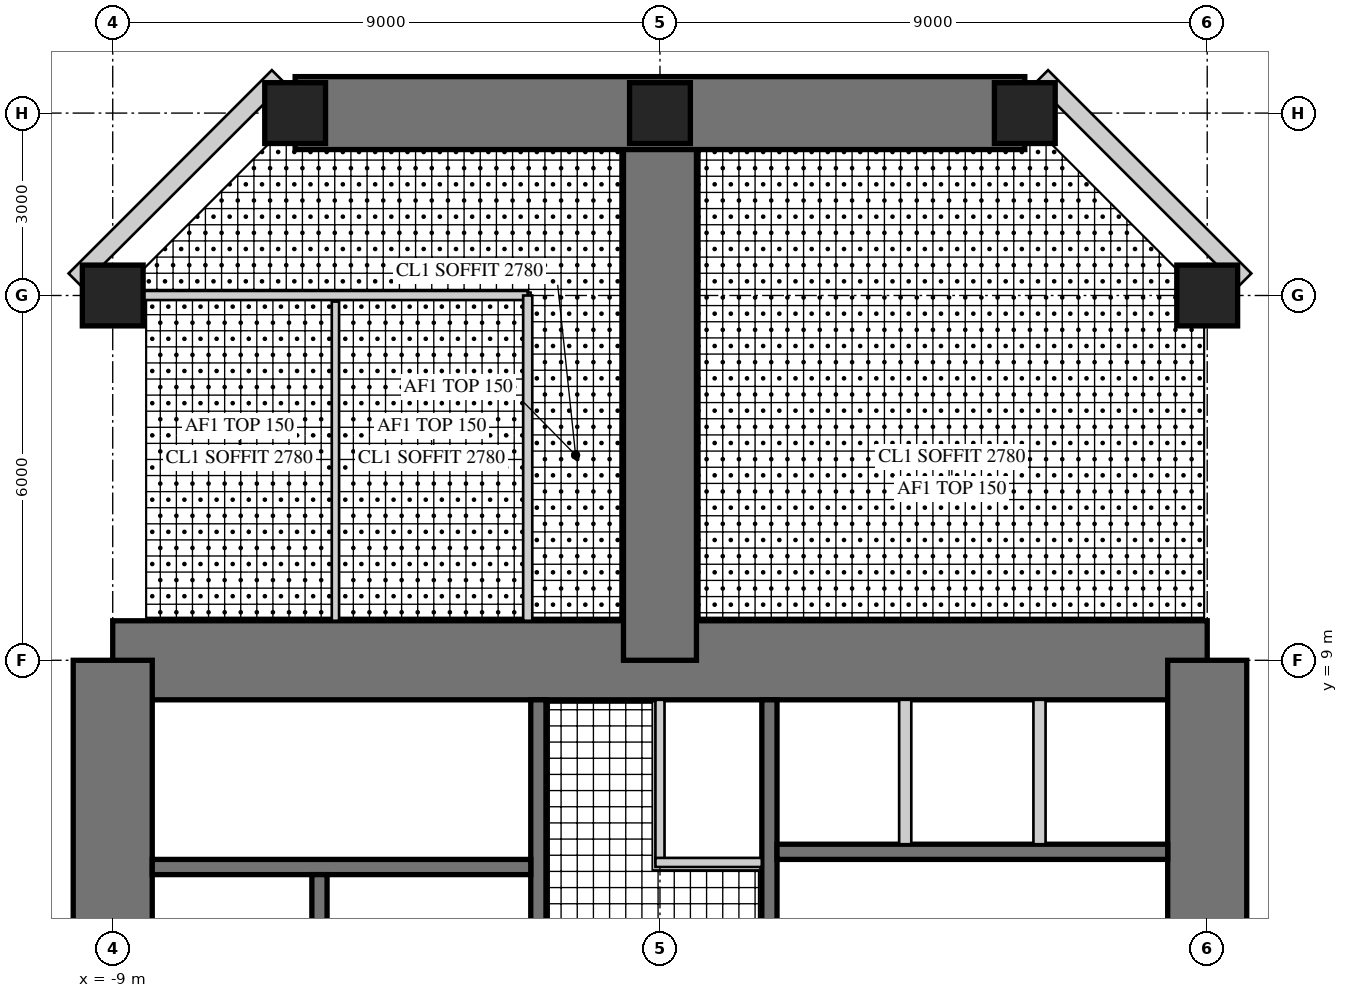
"""IFC4 building model, lengths in metres.
Left out: names, types, materials, properties, quantities, classifications, styles, units other than length and angle.
Written with IfcOpenShell. Run it as: python <this file> out.ifc"""

import sys

from ifc_helpers import new_model, si_unit, direction, frame, frame_2d, origin, origin_2d, place, context, subcontext, project, spatial, rectangle, hollow_rectangle, extrude, element, fill, save


model = new_model("IFC4")
c1 = context("Model", 3, precision=1e-05, world=origin(), true_north=direction((0.0, 1.0)))
c2 = subcontext(c1, "Body", "Model", "MODEL_VIEW")
j1 = project(units=[si_unit("LENGTHUNIT", "METRE"), si_unit("PLANEANGLEUNIT", "RADIAN")], contexts=[c1])
p1 = place(None, origin())
s1 = spatial("IfcSite", under=j1, at=p1, CompositionType="ELEMENT")
p2 = place(p1, origin())
s2 = spatial("IfcBuilding", under=s1, at=p2, CompositionType="ELEMENT")
p3 = place(p2, frame((0.0, 0.0, 136.5)))
s3 = spatial("IfcBuildingStorey", under=s2, at=p3, CompositionType="ELEMENT", Elevation=136.5)
p4 = place(p3, frame((9.0, 9.0, 0.0), z_axis=(0.0, 0.0, 1.0), x_axis=(-1.0, 0.0, 0.0)))
e1 = element("IfcWall", 1, at=p4, inside=s3, PredefinedType="SHEAR", context=c2, shape_type="SweptSolid", body=[
    extrude(rectangle(XDim=18.0, YDim=1.3, at=frame_2d((9.0, 0.0))), origin(), (0.0, 0.0, 1.0), 4.0),
])
p5 = place(p4, frame((9.8, 0.0, 0.0)))
e2 = element("IfcOpeningElement", 2, at=p5, cuts=e1, PredefinedType="OPENING", context=c2, shape_type="SweptSolid", body=[
    extrude(rectangle(XDim=1.0, YDim=2.4, at=frame_2d((0.5, 1.2))), frame((0.0, 0.66, 0.0), z_axis=(0.0, -1.0, 0.0), x_axis=(1.0, 0.0, 0.0)), (0.0, 0.0, 1.0), 1.32),
])
p6 = place(p3, frame((9.0, -9.0, 0.0), z_axis=(0.0, 0.0, 1.0), x_axis=(0.0, 1.0, 0.0)))
e3 = element("IfcWall", 3, at=p6, inside=s3, PredefinedType="SHEAR", context=c2, shape_type="SweptSolid", body=[
    extrude(rectangle(XDim=18.0, YDim=1.3, at=frame_2d((9.0, 0.0))), origin(), (0.0, 0.0, 1.0), 4.0),
])
p7 = place(p6, frame((9.8, 0.0, 0.0)))
e4 = element("IfcOpeningElement", 4, at=p7, cuts=e3, PredefinedType="OPENING", context=c2, shape_type="SweptSolid", body=[
    extrude(rectangle(XDim=1.0, YDim=2.4, at=frame_2d((0.5, 1.2))), frame((0.0, 0.66, 0.0), z_axis=(0.0, -1.0, 0.0), x_axis=(1.0, 0.0, 0.0)), (0.0, 0.0, 1.0), 1.32),
])
p8 = place(p3, frame((-9.0, 9.0, 0.0), z_axis=(0.0, 0.0, 1.0), x_axis=(0.0, -1.0, 0.0)))
e5 = element("IfcWall", 5, at=p8, inside=s3, PredefinedType="SHEAR", context=c2, shape_type="SweptSolid", body=[
    extrude(rectangle(XDim=18.0, YDim=1.3, at=frame_2d((9.0, 0.0))), origin(), (0.0, 0.0, 1.0), 4.0),
])
p9 = place(p8, frame((9.8, 0.0, 0.0)))
e6 = element("IfcOpeningElement", 6, at=p9, cuts=e5, PredefinedType="OPENING", context=c2, shape_type="SweptSolid", body=[
    extrude(rectangle(XDim=1.0, YDim=2.4, at=frame_2d((0.5, 1.2))), frame((0.0, 0.66, 0.0), z_axis=(0.0, -1.0, 0.0), x_axis=(1.0, 0.0, 0.0)), (0.0, 0.0, 1.0), 1.32),
])
p10 = place(p3, frame((1.8, 1.875, 0.0), z_axis=(0.0, 0.0, 1.0), x_axis=(0.0, 1.0, 0.0)))
e7 = element("IfcWall", 7, at=p10, inside=s3, PredefinedType="SHEAR", context=c2, shape_type="SweptSolid", body=[
    extrude(rectangle(XDim=6.475, YDim=0.25, at=frame_2d((3.238, 0.0))), origin(), (0.0, 0.0, 1.0), 4.0),
])
p11 = place(p10, frame((1.875, 0.0, 0.0)))
e8 = element("IfcOpeningElement", 8, at=p11, cuts=e7, PredefinedType="OPENING", context=c2, shape_type="SweptSolid", body=[
    extrude(rectangle(XDim=1.6, YDim=2.4, at=frame_2d((0.8, 1.2))), frame((0.0, 0.135, 0.0), z_axis=(0.0, -1.0, 0.0), x_axis=(1.0, 0.0, 0.0)), (0.0, 0.0, 1.0), 0.27),
])
p12 = place(p3, frame((1.925, 5.85, 0.0), z_axis=(0.0, 0.0, 1.0), x_axis=(1.0, 0.0, 0.0)))
e9 = element("IfcWall", 9, at=p12, inside=s3, PredefinedType="SHEAR", context=c2, shape_type="SweptSolid", body=[
    extrude(rectangle(XDim=6.425, YDim=0.25, at=frame_2d((3.212, 0.0))), origin(), (0.0, 0.0, 1.0), 4.0),
])
p13 = place(p12, frame((0.454, 0.0, 0.0)))
e10 = element("IfcOpeningElement", 10, at=p13, cuts=e9, PredefinedType="OPENING", context=c2, shape_type="SweptSolid", body=[
    extrude(rectangle(XDim=1.1, YDim=2.2, at=frame_2d((0.55, 1.1))), frame((0.0, 0.135, 0.0), z_axis=(0.0, -1.0, 0.0), x_axis=(1.0, 0.0, 0.0)), (0.0, 0.0, 1.0), 0.27),
])
p14 = place(p12, frame((2.663, 0.0, 0.0)))
e11 = element("IfcOpeningElement", 11, at=p14, cuts=e9, PredefinedType="OPENING", context=c2, shape_type="SweptSolid", body=[
    extrude(rectangle(XDim=1.1, YDim=2.2, at=frame_2d((0.55, 1.1))), frame((0.0, 0.135, 0.0), z_axis=(0.0, -1.0, 0.0), x_axis=(1.0, 0.0, 0.0)), (0.0, 0.0, 1.0), 0.27),
])
p15 = place(p12, frame((4.871, 0.0, 0.0)))
e12 = element("IfcOpeningElement", 12, at=p15, cuts=e9, PredefinedType="OPENING", context=c2, shape_type="SweptSolid", body=[
    extrude(rectangle(XDim=1.1, YDim=2.2, at=frame_2d((0.55, 1.1))), frame((0.0, 0.135, 0.0), z_axis=(0.0, -1.0, 0.0), x_axis=(1.0, 0.0, 0.0)), (0.0, 0.0, 1.0), 0.27),
])
for number, where, z_axis, x_axis in (
    (13, (4.033, 5.975, 0.0), (0.0, 0.0, 1.0), (0.0, 1.0, 0.0)),
    (14, (6.242, 5.975, 0.0), (0.0, 0.0, 1.0), (0.0, 1.0, 0.0)),
):
    element("IfcWall", number, at=place(p3, frame(where, z_axis=z_axis, x_axis=x_axis)), inside=s3, PredefinedType="PARTITIONING", context=c2, shape_type="SweptSolid", body=[
        extrude(rectangle(XDim=2.375, YDim=0.2, at=frame_2d((1.188, 0.0))), origin(), (0.0, 0.0, 1.0), 4.0),
    ])
p16 = place(p3, frame((-2.0, 1.675, 0.0), z_axis=(0.0, 0.0, 1.0), x_axis=(0.0, 1.0, 0.0)))
e15 = element("IfcWall", 15, at=p16, inside=s3, PredefinedType="SHEAR", context=c2, shape_type="SweptSolid", body=[
    extrude(rectangle(XDim=6.675, YDim=0.25, at=frame_2d((3.337, 0.0))), origin(), (0.0, 0.0, 1.0), 4.0),
])
p17 = place(p16, frame((0.725, 0.0, 0.0)))
e16 = element("IfcOpeningElement", 16, at=p17, cuts=e15, PredefinedType="OPENING", context=c2, shape_type="SweptSolid", body=[
    extrude(rectangle(XDim=1.0, YDim=2.1, at=frame_2d((0.5, 1.05))), frame((0.0, 0.135, 0.0), z_axis=(0.0, -1.0, 0.0), x_axis=(1.0, 0.0, 0.0)), (0.0, 0.0, 1.0), 0.27),
])
p18 = place(p3, frame((-2.125, 5.6, 0.0), z_axis=(0.0, 0.0, 1.0), x_axis=(-1.0, 0.0, 0.0)))
e17 = element("IfcWall", 17, at=p18, inside=s3, PredefinedType="SHEAR", context=c2, shape_type="SweptSolid", body=[
    extrude(rectangle(XDim=6.225, YDim=0.25, at=frame_2d((3.113, 0.0))), origin(), (0.0, 0.0, 1.0), 4.0),
])
p19 = place(p18, frame((0.175, 0.0, 0.0)))
e18 = element("IfcOpeningElement", 18, at=p19, cuts=e17, PredefinedType="OPENING", context=c2, shape_type="SweptSolid", body=[
    extrude(rectangle(XDim=1.0, YDim=2.1, at=frame_2d((0.5, 1.05))), frame((0.0, 0.135, 0.0), z_axis=(0.0, -1.0, 0.0), x_axis=(1.0, 0.0, 0.0)), (0.0, 0.0, 1.0), 0.27),
])
p20 = place(p3, frame((-5.6, 1.925, 0.0), z_axis=(0.0, 0.0, 1.0), x_axis=(0.0, 1.0, 0.0)))
e19 = element("IfcWall", 19, at=p20, inside=s3, PredefinedType="SHEAR", context=c2, shape_type="SweptSolid", body=[
    extrude(rectangle(XDim=3.55, YDim=0.25, at=frame_2d((1.775, 0.0))), origin(), (0.0, 0.0, 1.0), 4.0),
])
p21 = place(p20, frame((1.525, 0.0, 0.0)))
e20 = element("IfcOpeningElement", 20, at=p21, cuts=e19, PredefinedType="OPENING", context=c2, shape_type="SweptSolid", body=[
    extrude(rectangle(XDim=1.1, YDim=2.2, at=frame_2d((0.55, 1.1))), frame((0.0, 0.135, 0.0), z_axis=(0.0, -1.0, 0.0), x_axis=(1.0, 0.0, 0.0)), (0.0, 0.0, 1.0), 0.27),
])
p22 = place(p20, frame((0.075, 0.0, 0.0)))
e21 = element("IfcOpeningElement", 21, at=p22, cuts=e19, PredefinedType="OPENING", context=c2, shape_type="SweptSolid", body=[
    extrude(rectangle(XDim=0.8, YDim=2.1, at=frame_2d((0.4, 1.05))), frame((0.0, 0.135, 0.0), z_axis=(0.0, -1.0, 0.0), x_axis=(1.0, 0.0, 0.0)), (0.0, 0.0, 1.0), 0.27),
])
p23 = place(p3, frame((0.0, 9.0, 0.0), z_axis=(0.0, 0.0, 1.0), x_axis=(0.0, 1.0, 0.0)))
e22 = element("IfcWall", 22, at=p23, inside=s3, PredefinedType="SHEAR", context=c2, shape_type="SweptSolid", body=[
    extrude(rectangle(XDim=9.0, YDim=1.2, at=frame_2d((4.5, 0.0))), origin(), (0.0, 0.0, 1.0), 4.0),
])
p24 = place(p23, frame((4.3, 0.0, 0.0)))
e23 = element("IfcOpeningElement", 23, at=p24, cuts=e22, PredefinedType="OPENING", context=c2, shape_type="SweptSolid", body=[
    extrude(rectangle(XDim=1.0, YDim=2.2, at=frame_2d((0.5, 1.1))), frame((0.0, 0.61, 0.0), z_axis=(0.0, -1.0, 0.0), x_axis=(1.0, 0.0, 0.0)), (0.0, 0.0, 1.0), 1.22),
])
p25 = place(p3, frame((6.0, 18.0, 0.0), z_axis=(0.0, 0.0, 1.0), x_axis=(-1.0, 0.0, 0.0)))
e24 = element("IfcWall", 24, at=p25, inside=s3, PredefinedType="SHEAR", context=c2, shape_type="SweptSolid", body=[
    extrude(rectangle(XDim=12.0, YDim=1.2, at=frame_2d((6.0, 0.0))), origin(), (0.0, 0.0, 1.0), 4.0),
])
p26 = place(p25, frame((1.55, 0.0, 0.6)))
e25 = element("IfcOpeningElement", 25, at=p26, cuts=e24, PredefinedType="OPENING", context=c2, shape_type="SweptSolid", body=[
    extrude(rectangle(XDim=3.0, YDim=2.4, at=frame_2d((1.5, 1.2))), frame((0.0, 0.61, 0.0), z_axis=(0.0, -1.0, 0.0), x_axis=(1.0, 0.0, 0.0)), (0.0, 0.0, 1.0), 1.22),
])
p27 = place(p25, frame((7.45, 0.0, 0.6)))
e26 = element("IfcOpeningElement", 26, at=p27, cuts=e24, PredefinedType="OPENING", context=c2, shape_type="SweptSolid", body=[
    extrude(rectangle(XDim=3.0, YDim=2.4, at=frame_2d((1.5, 1.2))), frame((0.0, 0.61, 0.0), z_axis=(0.0, -1.0, 0.0), x_axis=(1.0, 0.0, 0.0)), (0.0, 0.0, 1.0), 1.22),
])
for number, where, z_axis, x_axis in (
    (27, (9.0, 15.0, 0.0), (0.0, 0.0, 1.0), (1.0, 0.0, 0.0)),
    (28, (-9.0, 15.0, 0.0), (0.0, 0.0, 1.0), (1.0, 0.0, 0.0)),
    (29, (6.0, 18.0, 0.0), (0.0, 0.0, 1.0), (1.0, 0.0, 0.0)),
    (30, (0.0, 18.0, 0.0), (0.0, 0.0, 1.0), (1.0, 0.0, 0.0)),
    (31, (-6.0, 18.0, 0.0), (0.0, 0.0, 1.0), (1.0, 0.0, 0.0)),
):
    element("IfcColumn", number, at=place(p3, frame(where, z_axis=z_axis, x_axis=x_axis)), inside=s3, PredefinedType="COLUMN", context=c2, shape_type="SweptSolid", body=[
        extrude(rectangle(XDim=1.0, YDim=1.0, at=origin_2d()), origin(), (0.0, 0.0, 1.0), 4.0),
    ])
p28 = place(p3, frame((9.62, 15.257, 0.0), z_axis=(0.0, 0.0, 1.0), x_axis=(-0.707106781187, 0.707106781187, 0.0)))
e32 = element("IfcWall", 32, at=p28, inside=s3, PredefinedType="SOLIDWALL", context=c2, shape_type="SweptSolid", body=[
    extrude(rectangle(XDim=4.728, YDim=0.3, at=frame_2d((2.364, 0.0))), origin(), (0.0, 0.0, 1.0), 3.8),
])
p29 = place(p28, frame((1.914, 0.0, 0.3)))
e33 = element("IfcOpeningElement", 33, at=p29, cuts=e32, PredefinedType="OPENING", context=c2, shape_type="SweptSolid", body=[
    extrude(rectangle(XDim=0.9, YDim=2.4, at=frame_2d((0.45, 1.2))), frame((0.0, 0.16, 0.0), z_axis=(0.0, -1.0, 0.0), x_axis=(1.0, 0.0, 0.0)), (0.0, 0.0, 1.0), 0.32),
])
p30 = place(p3, frame((-6.277, 18.6, 0.0), z_axis=(0.0, 0.0, 1.0), x_axis=(-0.707106781187, -0.707106781187, 0.0)))
e34 = element("IfcWall", 34, at=p30, inside=s3, PredefinedType="SOLIDWALL", context=c2, shape_type="SweptSolid", body=[
    extrude(rectangle(XDim=4.728, YDim=0.3, at=frame_2d((2.364, 0.0))), origin(), (0.0, 0.0, 1.0), 3.8),
])
p31 = place(p30, frame((1.914, 0.0, 0.3)))
e35 = element("IfcOpeningElement", 35, at=p31, cuts=e34, PredefinedType="OPENING", context=c2, shape_type="SweptSolid", body=[
    extrude(rectangle(XDim=0.9, YDim=2.4, at=frame_2d((0.45, 1.2))), frame((0.0, 0.16, 0.0), z_axis=(0.0, -1.0, 0.0), x_axis=(1.0, 0.0, 0.0)), (0.0, 0.0, 1.0), 0.32),
])
p32 = place(p3, frame((0.0, 5.675, 0.0), z_axis=(0.0, 0.0, 1.0), x_axis=(0.0, 1.0, 0.0)))
e36 = element("IfcWall", 36, at=p32, inside=s3, PredefinedType="PARTITIONING", context=c2, shape_type="SweptSolid", body=[
    extrude(rectangle(XDim=2.675, YDim=0.15, at=frame_2d((1.337, 0.0))), origin(), (0.0, 0.0, 1.0), 3.8),
])
p33 = place(p32, frame((0.4, 0.0, 0.0)))
e37 = element("IfcOpeningElement", 37, at=p33, cuts=e36, PredefinedType="OPENING", context=c2, shape_type="SweptSolid", body=[
    extrude(rectangle(XDim=1.0, YDim=2.1, at=frame_2d((0.5, 1.05))), frame((0.0, 0.085, 0.0), z_axis=(0.0, -1.0, 0.0), x_axis=(1.0, 0.0, 0.0)), (0.0, 0.0, 1.0), 0.17),
])
p34 = place(p3, frame((1.675, 5.675, 0.0), z_axis=(0.0, 0.0, 1.0), x_axis=(-1.0, 0.0, 0.0)))
e38 = element("IfcWall", 38, at=p34, inside=s3, PredefinedType="PARTITIONING", context=c2, shape_type="SweptSolid", body=[
    extrude(rectangle(XDim=1.75, YDim=0.15, at=frame_2d((0.875, 0.0))), origin(), (0.0, 0.0, 1.0), 3.8),
])
p35 = place(p3, frame((-2.175, 15.0, 0.0), z_axis=(0.0, 0.0, 1.0), x_axis=(-1.0, 0.0, 0.0)))
e39 = element("IfcWall", 39, at=p35, inside=s3, PredefinedType="PARTITIONING", context=c2, shape_type="SweptSolid", body=[
    extrude(rectangle(XDim=6.325, YDim=0.15, at=frame_2d((3.163, 0.0))), origin(), (0.0, 0.0, 1.0), 3.0),
])
p36 = place(p35, frame((1.081, 0.0, 0.0)))
e40 = element("IfcOpeningElement", 40, at=p36, cuts=e39, PredefinedType="OPENING", context=c2, shape_type="SweptSolid", body=[
    extrude(rectangle(XDim=1.0, YDim=2.1, at=frame_2d((0.5, 1.05))), frame((0.0, 0.085, 0.0), z_axis=(0.0, -1.0, 0.0), x_axis=(1.0, 0.0, 0.0)), (0.0, 0.0, 1.0), 0.17),
])
p37 = place(p35, frame((4.244, 0.0, 0.0)))
e41 = element("IfcOpeningElement", 41, at=p37, cuts=e39, PredefinedType="OPENING", context=c2, shape_type="SweptSolid", body=[
    extrude(rectangle(XDim=1.0, YDim=2.1, at=frame_2d((0.5, 1.05))), frame((0.0, 0.085, 0.0), z_axis=(0.0, -1.0, 0.0), x_axis=(1.0, 0.0, 0.0)), (0.0, 0.0, 1.0), 0.17),
])
p38 = place(p3, frame((-2.175, 9.65, 0.0), z_axis=(0.0, 0.0, 1.0), x_axis=(0.0, 1.0, 0.0)))
e42 = element("IfcWall", 42, at=p38, inside=s3, PredefinedType="PARTITIONING", context=c2, shape_type="SweptSolid", body=[
    extrude(rectangle(XDim=5.35, YDim=0.15, at=frame_2d((2.675, 0.0))), origin(), (0.0, 0.0, 1.0), 3.8),
])
p39 = place(p3, frame((-5.337, 9.65, 0.0), z_axis=(0.0, 0.0, 1.0), x_axis=(0.0, 1.0, 0.0)))
e43 = element("IfcWall", 43, at=p39, inside=s3, PredefinedType="PLUMBINGWALL", context=c2, shape_type="SweptSolid", body=[
    extrude(rectangle(XDim=5.25, YDim=0.12, at=frame_2d((2.625, 0.0))), origin(), (0.0, 0.0, 1.0), 3.8),
])
p40 = place(p29, origin())
e44 = element("IfcWindow", 44, at=p40, inside=s3, PartitioningType="SINGLE_PANEL", PredefinedType="WINDOW", context=c2, shape_type="SweptSolid", body=[
    extrude(hollow_rectangle(XDim=0.9, YDim=2.4, WallThickness=0.06, at=frame_2d((0.45, 1.2))), frame((0.0, 0.03, 0.0), z_axis=(0.0, -1.0, 0.0), x_axis=(1.0, 0.0, 0.0)), (0.0, 0.0, 1.0), 0.06),
    extrude(rectangle(XDim=0.779, YDim=2.279, at=frame_2d((0.45, 1.2))), frame((0.0, 0.03, 0.0), z_axis=(0.0, -1.0, 0.0), x_axis=(1.0, 0.0, 0.0)), (0.0, 0.0, 1.0), 0.06),
])
fill(e33, e44)
p41 = place(p26, origin())
e45 = element("IfcWindow", 45, at=p41, inside=s3, PartitioningType="SINGLE_PANEL", PredefinedType="WINDOW", context=c2, shape_type="SweptSolid", body=[
    extrude(hollow_rectangle(XDim=3.0, YDim=2.4, WallThickness=0.06, at=frame_2d((1.5, 1.2))), frame((0.0, 0.03, 0.0), z_axis=(0.0, -1.0, 0.0), x_axis=(1.0, 0.0, 0.0)), (0.0, 0.0, 1.0), 0.06),
    extrude(rectangle(XDim=2.879, YDim=2.279, at=frame_2d((1.5, 1.2))), frame((0.0, 0.03, 0.0), z_axis=(0.0, -1.0, 0.0), x_axis=(1.0, 0.0, 0.0)), (0.0, 0.0, 1.0), 0.06),
])
fill(e25, e45)
p42 = place(p27, origin())
e46 = element("IfcWindow", 46, at=p42, inside=s3, PartitioningType="SINGLE_PANEL", PredefinedType="WINDOW", context=c2, shape_type="SweptSolid", body=[
    extrude(hollow_rectangle(XDim=3.0, YDim=2.4, WallThickness=0.06, at=frame_2d((1.5, 1.2))), frame((0.0, 0.03, 0.0), z_axis=(0.0, -1.0, 0.0), x_axis=(1.0, 0.0, 0.0)), (0.0, 0.0, 1.0), 0.06),
    extrude(rectangle(XDim=2.879, YDim=2.279, at=frame_2d((1.5, 1.2))), frame((0.0, 0.03, 0.0), z_axis=(0.0, -1.0, 0.0), x_axis=(1.0, 0.0, 0.0)), (0.0, 0.0, 1.0), 0.06),
])
fill(e26, e46)
p43 = place(p31, origin())
e47 = element("IfcWindow", 47, at=p43, inside=s3, PartitioningType="SINGLE_PANEL", PredefinedType="WINDOW", context=c2, shape_type="SweptSolid", body=[
    extrude(hollow_rectangle(XDim=0.9, YDim=2.4, WallThickness=0.06, at=frame_2d((0.45, 1.2))), frame((0.0, 0.03, 0.0), z_axis=(0.0, -1.0, 0.0), x_axis=(1.0, 0.0, 0.0)), (0.0, 0.0, 1.0), 0.06),
    extrude(rectangle(XDim=0.779, YDim=2.279, at=frame_2d((0.45, 1.2))), frame((0.0, 0.03, 0.0), z_axis=(0.0, -1.0, 0.0), x_axis=(1.0, 0.0, 0.0)), (0.0, 0.0, 1.0), 0.06),
])
fill(e35, e47)
p44 = place(p33, frame((1.0, 0.0, 0.0), z_axis=(0.0, 0.0, 1.0), x_axis=(-1.0, 0.0, 0.0)))
e48 = element("IfcDoor", 48, at=p44, inside=s3, OperationType="SINGLE_SWING_RIGHT", PredefinedType="DOOR", context=c2, shape_type="SweptSolid", body=[
    extrude(rectangle(XDim=1.0, YDim=2.1, at=frame_2d((0.5, 1.05))), frame((0.0, 0.025, 0.0), z_axis=(0.0, -1.0, 0.0), x_axis=(1.0, 0.0, 0.0)), (0.0, 0.0, 1.0), 0.05),
])
fill(e37, e48)
p45 = place(p36, origin())
e49 = element("IfcDoor", 49, at=p45, inside=s3, OperationType="SINGLE_SWING_LEFT", PredefinedType="DOOR", context=c2, shape_type="SweptSolid", body=[
    extrude(rectangle(XDim=1.0, YDim=2.1, at=frame_2d((0.5, 1.05))), frame((0.0, 0.025, 0.0), z_axis=(0.0, -1.0, 0.0), x_axis=(1.0, 0.0, 0.0)), (0.0, 0.0, 1.0), 0.05),
])
fill(e40, e49)
p46 = place(p37, origin())
e50 = element("IfcDoor", 50, at=p46, inside=s3, OperationType="SINGLE_SWING_LEFT", PredefinedType="DOOR", context=c2, shape_type="SweptSolid", body=[
    extrude(rectangle(XDim=1.0, YDim=2.1, at=frame_2d((0.5, 1.05))), frame((0.0, 0.025, 0.0), z_axis=(0.0, -1.0, 0.0), x_axis=(1.0, 0.0, 0.0)), (0.0, 0.0, 1.0), 0.05),
])
fill(e41, e50)
p47 = place(p24, origin())
e51 = element("IfcDoor", 51, at=p47, inside=s3, OperationType="SINGLE_SWING_RIGHT", PredefinedType="DOOR", context=c2, shape_type="SweptSolid", body=[
    extrude(rectangle(XDim=1.0, YDim=2.2, at=frame_2d((0.5, 1.1))), frame((0.0, 0.025, 0.0), z_axis=(0.0, -1.0, 0.0), x_axis=(1.0, 0.0, 0.0)), (0.0, 0.0, 1.0), 0.05),
])
fill(e23, e51)
p48 = place(p5, frame((1.0, 0.0, 0.0), z_axis=(0.0, 0.0, 1.0), x_axis=(-1.0, 0.0, 0.0)))
e52 = element("IfcDoor", 52, at=p48, inside=s3, OperationType="SINGLE_SWING_RIGHT", PredefinedType="DOOR", context=c2, shape_type="SweptSolid", body=[
    extrude(rectangle(XDim=1.0, YDim=2.4, at=frame_2d((0.5, 1.2))), frame((0.0, -0.005, 0.0), z_axis=(0.0, -1.0, 0.0), x_axis=(1.0, 0.0, 0.0)), (0.0, 0.0, 1.0), 0.05),
])
fill(e2, e52)
p49 = place(p13, origin())
e53 = element("IfcDoor", 53, at=p49, inside=s3, OperationType="DOUBLE_DOOR_SLIDING", PredefinedType="DOOR", context=c2, shape_type="SweptSolid", body=[
    extrude(rectangle(XDim=1.1, YDim=2.2, at=frame_2d((0.55, 1.1))), frame((0.0, 0.025, 0.0), z_axis=(0.0, -1.0, 0.0), x_axis=(1.0, 0.0, 0.0)), (0.0, 0.0, 1.0), 0.05),
])
fill(e10, e53)
p50 = place(p14, origin())
e54 = element("IfcDoor", 54, at=p50, inside=s3, OperationType="DOUBLE_DOOR_SLIDING", PredefinedType="DOOR", context=c2, shape_type="SweptSolid", body=[
    extrude(rectangle(XDim=1.1, YDim=2.2, at=frame_2d((0.55, 1.1))), frame((0.0, 0.025, 0.0), z_axis=(0.0, -1.0, 0.0), x_axis=(1.0, 0.0, 0.0)), (0.0, 0.0, 1.0), 0.05),
])
fill(e11, e54)
p51 = place(p15, origin())
e55 = element("IfcDoor", 55, at=p51, inside=s3, OperationType="DOUBLE_DOOR_SLIDING", PredefinedType="DOOR", context=c2, shape_type="SweptSolid", body=[
    extrude(rectangle(XDim=1.1, YDim=2.2, at=frame_2d((0.55, 1.1))), frame((0.0, 0.025, 0.0), z_axis=(0.0, -1.0, 0.0), x_axis=(1.0, 0.0, 0.0)), (0.0, 0.0, 1.0), 0.05),
])
fill(e12, e55)
p52 = place(p11, origin())
e56 = element("IfcDoor", 56, at=p52, inside=s3, OperationType="DOUBLE_DOOR_DOUBLE_SWING", PredefinedType="DOOR", context=c2, shape_type="SweptSolid", body=[
    extrude(rectangle(XDim=1.6, YDim=2.4, at=frame_2d((0.8, 1.2))), frame((0.0, 0.025, 0.0), z_axis=(0.0, -1.0, 0.0), x_axis=(1.0, 0.0, 0.0)), (0.0, 0.0, 1.0), 0.05),
])
fill(e8, e56)
p53 = place(p19, frame((1.0, 0.0, 0.0), z_axis=(0.0, 0.0, 1.0), x_axis=(-1.0, 0.0, 0.0)))
e57 = element("IfcDoor", 57, at=p53, inside=s3, OperationType="SINGLE_SWING_RIGHT", PredefinedType="DOOR", context=c2, shape_type="SweptSolid", body=[
    extrude(rectangle(XDim=1.0, YDim=2.1, at=frame_2d((0.5, 1.05))), frame((0.0, 0.025, 0.0), z_axis=(0.0, -1.0, 0.0), x_axis=(1.0, 0.0, 0.0)), (0.0, 0.0, 1.0), 0.05),
])
fill(e18, e57)
save(model, sys.argv[1])
